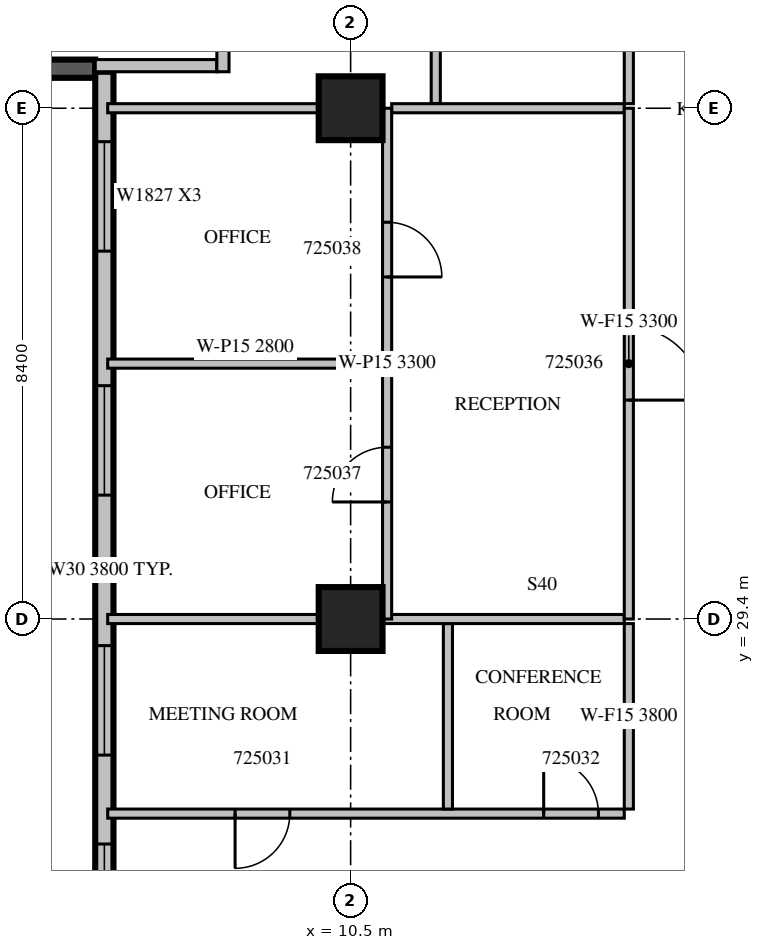
"""IFC4 building model, lengths in metres.
Left out: names, types, materials, properties, quantities, classifications, styles, units other than length and angle.
Written with IfcOpenShell. Run it as: python <this file> out.ifc"""

import sys

from ifc_helpers import new_model, si_unit, direction, frame, frame_2d, origin, origin_2d, place, context, subcontext, project, spatial, rectangle, extrude, source, transform, mapped, element, fill, save


model = new_model("IFC4")
c1 = context("Model", 3, precision=1e-05, world=origin(), true_north=direction((0.0, 1.0)))
c2 = subcontext(c1, "Body", "Model", "MODEL_VIEW")
j1 = project(units=[si_unit("LENGTHUNIT", "METRE"), si_unit("PLANEANGLEUNIT", "RADIAN")], contexts=[c1])
p1 = place(None, origin())
s1 = spatial("IfcSite", under=j1, at=p1, CompositionType="ELEMENT")
p2 = place(p1, origin())
s2 = spatial("IfcBuilding", under=s1, at=p2, CompositionType="ELEMENT")
p3 = place(p2, frame((0.0, 0.0, 116.1)))
s3 = spatial("IfcBuildingStorey", under=s2, at=p3, CompositionType="ELEMENT", Elevation=116.1)
m1 = source(origin(), c2, "Body", "SweptSolid", [
    extrude(rectangle(XDim=1.05, YDim=1.05, at=origin_2d()), origin(), (0.0, 0.0, 1.0), 4.2),
])
for number, where, z_axis, x_axis in (
    (1, (10.5, 29.4, 0.0), (0.0, 0.0, 1.0), (1.0, 0.0, 0.0)),
    (2, (10.5, 37.8, 0.0), (0.0, 0.0, 1.0), (1.0, 0.0, 0.0)),
):
    element("IfcColumn", number, at=place(p3, frame(where, z_axis=z_axis, x_axis=x_axis)), inside=s3, PredefinedType="COLUMN", context=c2, shape_type="MappedRepresentation", body=[
        mapped(m1, transform((0.0, 0.0, 0.0), scale=1.0)),
    ])
m2 = source(origin(), c2, "Body", "SweptSolid", [
    extrude(rectangle(XDim=6.1, YDim=0.3, at=frame_2d((3.05, 0.0))), origin(), (0.0, 0.0, 1.0), 3.8),
])
p4 = place(p3, frame((0.2, 38.45, 0.0), z_axis=(0.0, 0.0, 1.0), x_axis=(1.0, 0.0, 0.0)))
e3 = element("IfcWall", 3, at=p4, inside=s3, PredefinedType="SOLIDWALL", context=c2, shape_type="MappedRepresentation", body=[
    mapped(m2, transform((0.0, 0.0, 0.0), scale=1.0)),
])
m3 = source(origin(), c2, "Body", "SweptSolid", [
    extrude(rectangle(XDim=16.4, YDim=0.3, at=frame_2d((8.2, 0.0))), origin(), (0.0, 0.0, 1.0), 3.8),
])
p5 = place(p3, frame((6.45, 38.4, 0.0), z_axis=(0.0, 0.0, 1.0), x_axis=(0.0, -1.0, 0.0)))
e4 = element("IfcWall", 4, at=p5, inside=s3, PredefinedType="STANDARD", context=c2, shape_type="MappedRepresentation", body=[
    mapped(m3, transform((0.0, 0.0, 0.0), scale=1.0)),
])
m4 = source(origin(), c2, "Body", "SweptSolid", [
    extrude(rectangle(XDim=1.8, YDim=2.7, at=frame_2d((0.9, 1.35))), frame((0.0, 0.16, 0.0), z_axis=(0.0, -1.0, 0.0), x_axis=(1.0, 0.0, 0.0)), (0.0, 0.0, 1.0), 0.32),
])
p6 = place(p5, frame((1.15, 0.0, 0.6)))
e5 = element("IfcOpeningElement", 5, at=p6, cuts=e4, PredefinedType="OPENING", context=c2, shape_type="MappedRepresentation", body=[
    mapped(m4, transform((0.0, 0.0, 0.0), scale=1.0)),
])
p7 = place(p5, frame((5.162, 0.0, 0.6)))
e6 = element("IfcOpeningElement", 6, at=p7, cuts=e4, PredefinedType="OPENING", context=c2, shape_type="MappedRepresentation", body=[
    mapped(m4, transform((0.0, 0.0, 0.0), scale=1.0)),
])
p8 = place(p5, frame((9.438, 0.0, 0.6)))
e7 = element("IfcOpeningElement", 7, at=p8, cuts=e4, PredefinedType="OPENING", context=c2, shape_type="MappedRepresentation", body=[
    mapped(m4, transform((0.0, 0.0, 0.0), scale=1.0)),
])
m5 = source(origin(), c2, "Body", "SweptSolid", [
    extrude(rectangle(XDim=3.0, YDim=2.7, at=frame_2d((1.5, 1.35))), frame((0.0, 0.16, 0.0), z_axis=(0.0, -1.0, 0.0), x_axis=(1.0, 0.0, 0.0)), (0.0, 0.0, 1.0), 0.32),
])
p9 = place(p5, frame((12.7, 0.0, 0.6)))
e8 = element("IfcOpeningElement", 8, at=p9, cuts=e4, PredefinedType="OPENING", context=c2, shape_type="MappedRepresentation", body=[
    mapped(m5, transform((0.0, 0.0, 0.0), scale=1.0)),
])
m6 = source(origin(), c2, "Body", "SweptSolid", [
    extrude(rectangle(XDim=2.0, YDim=0.2, at=frame_2d((1.0, 0.0))), origin(), (0.0, 0.0, 1.0), 3.8),
])
p10 = place(p3, frame((6.3, 38.5, 0.0), z_axis=(0.0, 0.0, 1.0), x_axis=(1.0, 0.0, 0.0)))
e9 = element("IfcWall", 9, at=p10, inside=s3, PredefinedType="PARTITIONING", context=c2, shape_type="MappedRepresentation", body=[
    mapped(m6, transform((0.0, 0.0, 0.0), scale=1.0)),
])
m7 = source(origin(), c2, "Body", "SweptSolid", [
    extrude(rectangle(XDim=5.45, YDim=0.2, at=frame_2d((2.725, 0.0))), origin(), (0.0, 0.0, 1.0), 3.8),
])
p11 = place(p3, frame((8.4, 38.4, 0.0), z_axis=(0.0, 0.0, 1.0), x_axis=(0.0, 1.0, 0.0)))
e10 = element("IfcWall", 10, at=p11, inside=s3, PredefinedType="PARTITIONING", context=c2, shape_type="MappedRepresentation", body=[
    mapped(m7, transform((0.0, 0.0, 0.0), scale=1.0)),
])
m8 = source(origin(), c2, "Body", "SweptSolid", [
    extrude(rectangle(XDim=1.2, YDim=2.1, at=frame_2d((0.6, 1.05))), frame((0.0, 0.11, 0.0), z_axis=(0.0, -1.0, 0.0), x_axis=(1.0, 0.0, 0.0)), (0.0, 0.0, 1.0), 0.22),
])
p12 = place(p11, frame((0.4, 0.0, 0.0)))
e11 = element("IfcOpeningElement", 11, at=p12, cuts=e10, PredefinedType="OPENING", context=c2, shape_type="MappedRepresentation", body=[
    mapped(m8, transform((0.0, 0.0, 0.0), scale=1.0)),
])
m9 = source(origin(), c2, "Body", "SweptSolid", [
    extrude(rectangle(XDim=0.9, YDim=2.1, at=frame_2d((0.45, 1.05))), frame((0.0, 0.11, 0.0), z_axis=(0.0, -1.0, 0.0), x_axis=(1.0, 0.0, 0.0)), (0.0, 0.0, 1.0), 0.22),
])
p13 = place(p11, frame((3.25, 0.0, 0.0)))
e12 = element("IfcOpeningElement", 12, at=p13, cuts=e10, PredefinedType="OPENING", context=c2, shape_type="MappedRepresentation", body=[
    mapped(m9, transform((0.0, 0.0, 0.0), scale=1.0)),
])
m10 = source(origin(), c2, "Body", "SweptSolid", [
    extrude(rectangle(XDim=8.495, YDim=0.15, at=frame_2d((4.247, 0.0))), origin(), (0.0, 0.0, 1.0), 3.8),
])
p14 = place(p3, frame((6.505, 26.2, 0.0), z_axis=(0.0, 0.0, 1.0), x_axis=(1.0, 0.0, 0.0)))
e13 = element("IfcWall", 13, at=p14, inside=s3, PredefinedType="PARTITIONING", context=c2, shape_type="MappedRepresentation", body=[
    mapped(m10, transform((0.0, 0.0, 0.0), scale=1.0)),
])
m11 = source(origin(), c2, "Body", "SweptSolid", [
    extrude(rectangle(XDim=0.9, YDim=2.1, at=frame_2d((0.45, 1.05))), frame((0.0, 0.085, 0.0), z_axis=(0.0, -1.0, 0.0), x_axis=(1.0, 0.0, 0.0)), (0.0, 0.0, 1.0), 0.17),
])
p15 = place(p14, frame((2.095, 0.0, 0.0)))
e14 = element("IfcOpeningElement", 14, at=p15, cuts=e13, PredefinedType="OPENING", context=c2, shape_type="MappedRepresentation", body=[
    mapped(m11, transform((0.0, 0.0, 0.0), scale=1.0)),
])
p16 = place(p14, frame((7.17, 0.0, 0.0)))
e15 = element("IfcOpeningElement", 15, at=p16, cuts=e13, PredefinedType="OPENING", context=c2, shape_type="MappedRepresentation", body=[
    mapped(m11, transform((0.0, 0.0, 0.0), scale=1.0)),
])
m12 = source(origin(), c2, "Body", "SweptSolid", [
    extrude(rectangle(XDim=3.05, YDim=0.15, at=frame_2d((1.525, 0.0))), origin(), (0.0, 0.0, 1.0), 3.8),
])
for number, where, z_axis, x_axis in (
    (16, (12.1, 26.275, 0.0), (0.0, 0.0, 1.0), (0.0, 1.0, 0.0)),
    (17, (15.075, 26.275, 0.0), (0.0, 0.0, 1.0), (0.0, 1.0, 0.0)),
):
    element("IfcWall", number, at=place(p3, frame(where, z_axis=z_axis, x_axis=x_axis)), inside=s3, PredefinedType="PARTITIONING", context=c2, shape_type="MappedRepresentation", body=[
        mapped(m12, transform((0.0, 0.0, 0.0), scale=1.0)),
    ])
m13 = source(origin(), c2, "Body", "SweptSolid", [
    extrude(rectangle(XDim=3.471, YDim=0.15, at=frame_2d((1.736, 0.0))), origin(), (0.0, 0.0, 1.0), 3.8),
])
p17 = place(p3, frame((9.976, 29.4, 0.0), z_axis=(0.0, 0.0, 1.0), x_axis=(-1.0, 0.0, 0.0)))
e18 = element("IfcWall", 18, at=p17, inside=s3, PredefinedType="PARTITIONING", context=c2, shape_type="MappedRepresentation", body=[
    mapped(m13, transform((0.0, 0.0, 0.0), scale=1.0)),
])
m14 = source(origin(), c2, "Body", "SweptSolid", [
    extrude(rectangle(XDim=3.976, YDim=0.15, at=frame_2d((1.988, 0.0))), origin(), (0.0, 0.0, 1.0), 3.8),
])
p18 = place(p3, frame((15.0, 29.4, 0.0), z_axis=(0.0, 0.0, 1.0), x_axis=(-1.0, 0.0, 0.0)))
e19 = element("IfcWall", 19, at=p18, inside=s3, PredefinedType="PARTITIONING", context=c2, shape_type="MappedRepresentation", body=[
    mapped(m14, transform((0.0, 0.0, 0.0), scale=1.0)),
])
m15 = source(origin(), c2, "Body", "SweptSolid", [
    extrude(rectangle(XDim=6.45, YDim=0.15, at=frame_2d((3.225, 0.0))), origin(), (0.0, 0.0, 1.0), 3.8),
])
p19 = place(p3, frame((11.9, 44.325, 0.0), z_axis=(0.0, 0.0, 1.0), x_axis=(0.0, -1.0, 0.0)))
e20 = element("IfcWall", 20, at=p19, inside=s3, PredefinedType="PARTITIONING", context=c2, shape_type="MappedRepresentation", body=[
    mapped(m15, transform((0.0, 0.0, 0.0), scale=1.0)),
])
p20 = place(p3, frame((15.075, 37.875, 0.0), z_axis=(0.0, 0.0, 1.0), x_axis=(0.0, 1.0, 0.0)))
e21 = element("IfcWall", 21, at=p20, inside=s3, PredefinedType="PARTITIONING", context=c2, shape_type="MappedRepresentation", body=[
    mapped(m15, transform((0.0, 0.0, 0.0), scale=1.0)),
])
p21 = place(p20, frame((2.737, 0.0, 0.0)))
e22 = element("IfcOpeningElement", 22, at=p21, cuts=e21, PredefinedType="OPENING", context=c2, shape_type="MappedRepresentation", body=[
    mapped(m11, transform((0.0, 0.0, 0.0), scale=1.0)),
])
p22 = place(p3, frame((11.025, 33.6, 0.0), z_axis=(0.0, 0.0, 1.0), x_axis=(-1.0, 0.0, 0.0)))
e23 = element("IfcWall", 23, at=p22, inside=s3, PredefinedType="PARTITIONING", context=c2, shape_type="SweptSolid", body=[
    extrude(rectangle(XDim=4.52, YDim=0.15, at=frame_2d((2.26, 0.0))), origin(), (0.0, 0.0, 1.0), 2.8),
])
p23 = place(p3, frame((9.976, 37.8, 0.0), z_axis=(0.0, 0.0, 1.0), x_axis=(-1.0, 0.0, 0.0)))
e24 = element("IfcWall", 24, at=p23, inside=s3, PredefinedType="PARTITIONING", context=c2, shape_type="MappedRepresentation", body=[
    mapped(m13, transform((0.0, 0.0, 0.0), scale=1.0)),
])
m16 = source(origin(), c2, "Body", "SweptSolid", [
    extrude(rectangle(XDim=3.825, YDim=0.15, at=frame_2d((1.913, 0.0))), origin(), (0.0, 0.0, 1.0), 3.8),
])
p24 = place(p3, frame((15.0, 37.8, 0.0), z_axis=(0.0, 0.0, 1.0), x_axis=(-1.0, 0.0, 0.0)))
e25 = element("IfcWall", 25, at=p24, inside=s3, PredefinedType="PARTITIONING", context=c2, shape_type="MappedRepresentation", body=[
    mapped(m16, transform((0.0, 0.0, 0.0), scale=1.0)),
])
m17 = source(origin(), c2, "Body", "SweptSolid", [
    extrude(rectangle(XDim=8.4, YDim=0.15, at=frame_2d((4.2, 0.0))), origin(), (0.0, 0.0, 1.0), 3.3),
])
p25 = place(p3, frame((11.1, 29.4, 0.0), z_axis=(0.0, 0.0, 1.0), x_axis=(0.0, 1.0, 0.0)))
e26 = element("IfcWall", 26, at=p25, inside=s3, PredefinedType="PARTITIONING", context=c2, shape_type="MappedRepresentation", body=[
    mapped(m17, transform((0.0, 0.0, 0.0), scale=1.0)),
])
p26 = place(p25, frame((1.925, 0.0, 0.0)))
e27 = element("IfcOpeningElement", 27, at=p26, cuts=e26, PredefinedType="OPENING", context=c2, shape_type="MappedRepresentation", body=[
    mapped(m11, transform((0.0, 0.0, 0.0), scale=1.0)),
])
p27 = place(p25, frame((5.625, 0.0, 0.0)))
e28 = element("IfcOpeningElement", 28, at=p27, cuts=e26, PredefinedType="OPENING", context=c2, shape_type="MappedRepresentation", body=[
    mapped(m11, transform((0.0, 0.0, 0.0), scale=1.0)),
])
p28 = place(p3, frame((15.075, 29.4, 0.0), z_axis=(0.0, 0.0, 1.0), x_axis=(0.0, 1.0, 0.0)))
e29 = element("IfcWall", 29, at=p28, inside=s3, PredefinedType="PARTITIONING", context=c2, shape_type="MappedRepresentation", body=[
    mapped(m17, transform((0.0, 0.0, 0.0), scale=1.0)),
])
m18 = source(origin(), c2, "Body", "SweptSolid", [
    extrude(rectangle(XDim=1.2, YDim=2.1, at=frame_2d((0.6, 1.05))), frame((0.0, 0.085, 0.0), z_axis=(0.0, -1.0, 0.0), x_axis=(1.0, 0.0, 0.0)), (0.0, 0.0, 1.0), 0.17),
])
p29 = place(p28, frame((3.6, 0.0, 0.0)))
e30 = element("IfcOpeningElement", 30, at=p29, cuts=e29, PredefinedType="OPENING", context=c2, shape_type="MappedRepresentation", body=[
    mapped(m18, transform((0.0, 0.0, 0.0), scale=1.0)),
])
m19 = source(origin(), c2, "Body", "SweptSolid", [
    extrude(rectangle(XDim=1.8, YDim=2.7, at=frame_2d((0.9, 1.35))), frame((0.0, 0.03, 0.0), z_axis=(0.0, -1.0, 0.0), x_axis=(1.0, 0.0, 0.0)), (0.0, 0.0, 1.0), 0.06),
])
p30 = place(p6, origin())
e31 = element("IfcWindow", 31, at=p30, inside=s3, PartitioningType="SINGLE_PANEL", PredefinedType="WINDOW", context=c2, shape_type="MappedRepresentation", body=[
    mapped(m19, transform((0.0, 0.0, 0.0), scale=1.0)),
])
fill(e5, e31)
p31 = place(p7, origin())
e32 = element("IfcWindow", 32, at=p31, inside=s3, PartitioningType="SINGLE_PANEL", PredefinedType="WINDOW", context=c2, shape_type="MappedRepresentation", body=[
    mapped(m19, transform((0.0, 0.0, 0.0), scale=1.0)),
])
fill(e6, e32)
p32 = place(p8, origin())
e33 = element("IfcWindow", 33, at=p32, inside=s3, PartitioningType="SINGLE_PANEL", PredefinedType="WINDOW", context=c2, shape_type="MappedRepresentation", body=[
    mapped(m19, transform((0.0, 0.0, 0.0), scale=1.0)),
])
fill(e7, e33)
m20 = source(origin(), c2, "Body", "SweptSolid", [
    extrude(rectangle(XDim=3.0, YDim=2.7, at=frame_2d((1.5, 1.35))), frame((0.0, 0.03, 0.0), z_axis=(0.0, -1.0, 0.0), x_axis=(1.0, 0.0, 0.0)), (0.0, 0.0, 1.0), 0.06),
])
p33 = place(p9, origin())
e34 = element("IfcWindow", 34, at=p33, inside=s3, PartitioningType="SINGLE_PANEL", PredefinedType="WINDOW", context=c2, shape_type="MappedRepresentation", body=[
    mapped(m20, transform((0.0, 0.0, 0.0), scale=1.0)),
])
fill(e8, e34)
m21 = source(origin(), c2, "Body", "SweptSolid", [
    extrude(rectangle(XDim=0.9, YDim=2.1, at=frame_2d((0.45, 1.05))), frame((0.0, 0.025, 0.0), z_axis=(0.0, -1.0, 0.0), x_axis=(1.0, 0.0, 0.0)), (0.0, 0.0, 1.0), 0.05),
])
p34 = place(p15, origin())
e35 = element("IfcDoor", 35, at=p34, inside=s3, OperationType="SINGLE_SWING_RIGHT", PredefinedType="DOOR", context=c2, shape_type="MappedRepresentation", body=[
    mapped(m21, transform((0.0, 0.0, 0.0), scale=1.0)),
])
fill(e14, e35)
p35 = place(p16, origin())
e36 = element("IfcDoor", 36, at=p35, inside=s3, OperationType="SINGLE_SWING_LEFT", PredefinedType="DOOR", context=c2, shape_type="MappedRepresentation", body=[
    mapped(m21, transform((0.0, 0.0, 0.0), scale=1.0)),
])
fill(e15, e36)
m22 = source(origin(), c2, "Body", "SweptSolid", [
    extrude(rectangle(XDim=1.2, YDim=2.1, at=frame_2d((0.6, 1.05))), frame((0.0, 0.025, 0.0), z_axis=(0.0, -1.0, 0.0), x_axis=(1.0, 0.0, 0.0)), (0.0, 0.0, 1.0), 0.05),
])
p36 = place(p29, origin())
e37 = element("IfcDoor", 37, at=p36, inside=s3, OperationType="SINGLE_SWING_RIGHT", PredefinedType="DOOR", context=c2, shape_type="MappedRepresentation", body=[
    mapped(m22, transform((0.0, 0.0, 0.0), scale=1.0)),
])
fill(e30, e37)
p37 = place(p26, origin())
e38 = element("IfcDoor", 38, at=p37, inside=s3, OperationType="SINGLE_SWING_LEFT", PredefinedType="DOOR", context=c2, shape_type="MappedRepresentation", body=[
    mapped(m21, transform((0.0, 0.0, 0.0), scale=1.0)),
])
fill(e27, e38)
p38 = place(p27, origin())
e39 = element("IfcDoor", 39, at=p38, inside=s3, OperationType="SINGLE_SWING_RIGHT", PredefinedType="DOOR", context=c2, shape_type="MappedRepresentation", body=[
    mapped(m21, transform((0.0, 0.0, 0.0), scale=1.0)),
])
fill(e28, e39)
save(model, sys.argv[1])
